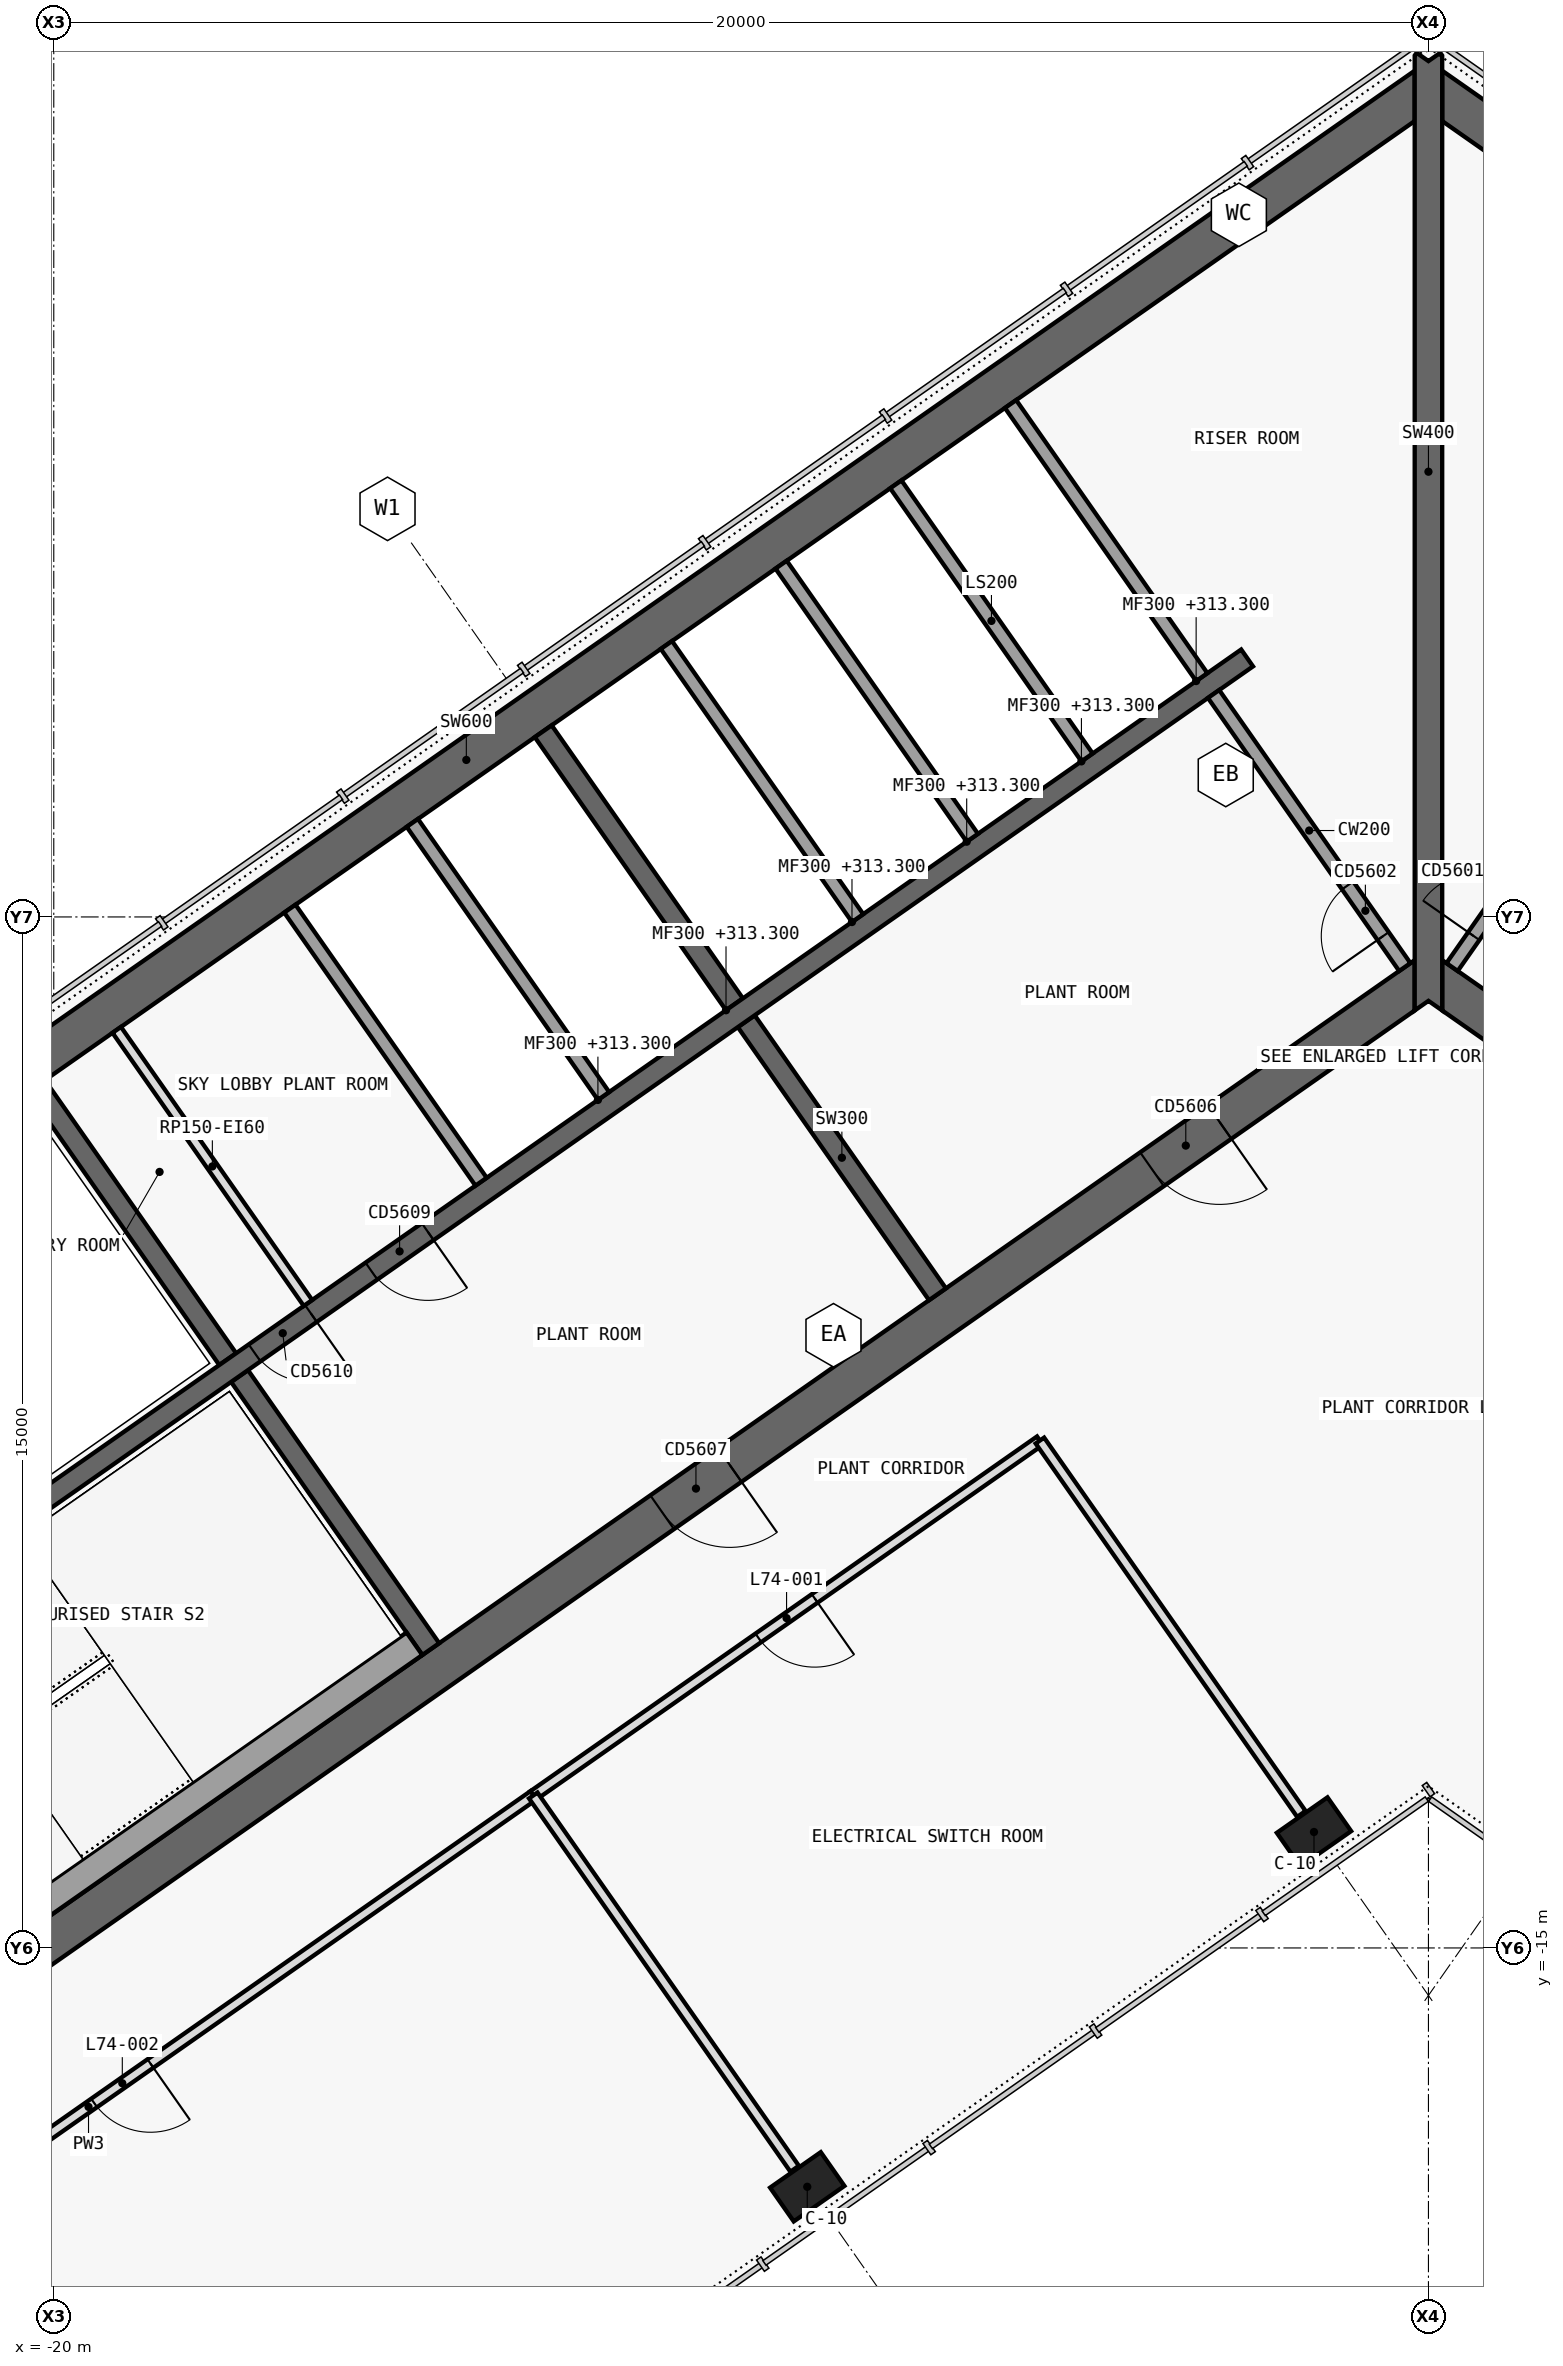
"""IFC4 building model, lengths in metres.
Left out: names, types, materials, properties, quantities, classifications, styles, units other than length and angle.
Written with IfcOpenShell. Run it as: python <this file> out.ifc"""

import sys

from ifc_helpers import new_model, si_unit, direction, frame, frame_2d, origin, origin_2d, place, context, subcontext, project, spatial, polyline, rectangle, outline, extrude, element, fill, save


model = new_model("IFC4")
c1 = context("Model", 3, precision=1e-05, world=origin(), true_north=direction((0.0, 1.0)))
c2 = subcontext(c1, "Body", "Model", "MODEL_VIEW")
j1 = project(units=[si_unit("LENGTHUNIT", "METRE"), si_unit("PLANEANGLEUNIT", "RADIAN")], contexts=[c1])
p1 = place(None, origin())
s1 = spatial("IfcSite", under=j1, at=p1, CompositionType="ELEMENT")
p2 = place(p1, origin())
s2 = spatial("IfcBuilding", under=s1, at=p2, CompositionType="ELEMENT")
p3 = place(p2, frame((0.0, 0.0, 313.3)))
s3 = spatial("IfcBuildingStorey", under=s2, at=p3, CompositionType="ELEMENT", Elevation=313.3)
p4 = place(p3, frame((-0.028, 12.066, 0.0), z_axis=(0.0, 0.0, 1.0), x_axis=(-0.819151382952, -0.573577380837, 0.0)))
e1 = element("IfcWall", 1, at=p4, inside=s3, PredefinedType="SHEAR", context=c2, shape_type="SweptSolid", body=[
    extrude(outline(polyline([(33.898, 0.3), (0.42, 0.3), (0.0, -0.3), (33.898, -0.3), (33.898, 0.3)])), origin(), (0.0, 0.0, 1.0), 5.5),
])
p5 = place(p3, frame((-0.028, -0.874, 0.0), z_axis=(0.0, 0.0, 1.0), x_axis=(-0.819150035022, -0.573579305871, 0.0)))
e2 = element("IfcWall", 2, at=p5, inside=s3, PredefinedType="SHEAR", context=c2, shape_type="SweptSolid", body=[
    extrude(outline(polyline([(26.476, 0.3), (0.42, 0.3), (0.0, -0.3), (26.476, -0.3), (26.476, 0.3)])), origin(), (0.0, 0.0, 1.0), 5.5),
])
p6 = place(p5, frame((3.676, 0.0, 0.0)))
e3 = element("IfcOpeningElement", 3, at=p6, cuts=e2, PredefinedType="OPENING", context=c2, shape_type="SweptSolid", body=[
    extrude(rectangle(XDim=1.2, YDim=2.1, at=frame_2d((0.6, 1.05))), frame((0.0, 0.31, 0.0), z_axis=(0.0, -1.0, 0.0), x_axis=(1.0, 0.0, 0.0)), (0.0, 0.0, 1.0), 0.62),
])
p7 = place(p5, frame((12.376, 0.0, 0.0)))
e4 = element("IfcOpeningElement", 4, at=p7, cuts=e2, PredefinedType="OPENING", context=c2, shape_type="SweptSolid", body=[
    extrude(rectangle(XDim=1.2, YDim=2.1, at=frame_2d((0.6, 1.05))), frame((0.0, 0.31, 0.0), z_axis=(0.0, -1.0, 0.0), x_axis=(1.0, 0.0, 0.0)), (0.0, 0.0, 1.0), 0.62),
])
p8 = place(p3, frame((-7.143, -5.49, 0.0), z_axis=(0.0, 0.0, 1.0), x_axis=(-0.573617744349, 0.819123118565, 0.0)))
e5 = element("IfcWall", 5, at=p8, inside=s3, PredefinedType="SHEAR", context=c2, shape_type="SweptSolid", body=[
    extrude(outline(polyline([(4.85, 0.15), (0.0, 0.15), (0.0, -0.15), (4.85, -0.15), (4.85, 0.15)])), origin(), (0.0, 0.0, 1.0), 5.5),
])
p9 = place(p3, frame((-10.097, -1.271, 0.0), z_axis=(0.0, 0.0, 1.0), x_axis=(-0.573560315113, 0.819163332265, 0.0)))
e6 = element("IfcWall", 6, at=p9, inside=s3, PredefinedType="SHEAR", context=c2, shape_type="SweptSolid", body=[
    extrude(outline(polyline([(4.85, -0.15), (4.85, 0.15), (0.0, 0.15), (0.0, -0.15), (4.85, -0.15)])), origin(), (0.0, 0.0, 1.0), 5.5),
])
p10 = place(p3, frame((-14.515, -10.652, 0.0), z_axis=(0.0, 0.0, 1.0), x_axis=(-0.573560315113, 0.819163332265, 0.0)))
e7 = element("IfcWall", 7, at=p10, inside=s3, PredefinedType="SHEAR", context=c2, shape_type="SweptSolid", body=[
    extrude(outline(polyline([(4.85, 0.15), (0.0, 0.15), (0.0, -0.15), (4.85, -0.15), (4.85, 0.15)])), origin(), (0.0, 0.0, 1.0), 5.5),
])
p11 = place(p3, frame((-17.469, -6.433, 0.0), z_axis=(0.0, 0.0, 1.0), x_axis=(-0.573594092424, 0.81913968109, 0.0)))
e8 = element("IfcWall", 8, at=p11, inside=s3, PredefinedType="SHEAR", context=c2, shape_type="SweptSolid", body=[
    extrude(outline(polyline([(4.85, -0.15), (4.85, 0.15), (0.0, 0.15), (0.0, -0.15), (4.85, -0.15)])), origin(), (0.0, 0.0, 1.0), 5.5),
])
p12 = place(p3, frame((-2.638, 3.768, 0.0), z_axis=(0.0, 0.0, 1.0), x_axis=(-0.819155014212, -0.573572194837, 0.0)))
e9 = element("IfcWall", 9, at=p12, inside=s3, PredefinedType="SHEAR", context=c2, shape_type="SweptSolid", body=[
    extrude(outline(polyline([(26.4, 0.15), (0.0, 0.15), (0.0, -0.15), (26.4, -0.15), (26.4, 0.15)])), origin(), (0.0, 0.0, 1.0), 5.5),
])
p13 = place(p12, frame((14.552, 0.0, 0.0)))
e10 = element("IfcOpeningElement", 10, at=p13, cuts=e9, PredefinedType="OPENING", context=c2, shape_type="SweptSolid", body=[
    extrude(rectangle(XDim=1.0, YDim=2.1, at=frame_2d((0.5, 1.05))), frame((0.0, 0.16, 0.0), z_axis=(0.0, -1.0, 0.0), x_axis=(1.0, 0.0, 0.0)), (0.0, 0.0, 1.0), 0.32),
])
p14 = place(p12, frame((16.627, 0.0, 0.0)))
e11 = element("IfcOpeningElement", 11, at=p14, cuts=e9, PredefinedType="OPENING", context=c2, shape_type="SweptSolid", body=[
    extrude(rectangle(XDim=1.0, YDim=2.1, at=frame_2d((0.5, 1.05))), frame((0.0, 0.16, 0.0), z_axis=(0.0, -1.0, 0.0), x_axis=(1.0, 0.0, 0.0)), (0.0, 0.0, 1.0), 0.32),
])
p15 = place(p3, frame((0.028, 12.066, 0.0), z_axis=(0.0, 0.0, 1.0), x_axis=(0.819151382952, -0.573577380837, 0.0)))
e12 = element("IfcWall", 12, at=p15, inside=s3, PredefinedType="SHEAR", context=c2, shape_type="SweptSolid", body=[
    extrude(outline(polyline([(33.898, 0.3), (0.0, 0.3), (0.42, -0.3), (33.898, -0.3), (33.898, 0.3)])), origin(), (0.0, 0.0, 1.0), 5.5),
])
p16 = place(p3, frame((0.028, -0.874, 0.0), z_axis=(0.0, 0.0, 1.0), x_axis=(0.819150035022, -0.573579305871, 0.0)))
e13 = element("IfcWall", 13, at=p16, inside=s3, PredefinedType="SHEAR", context=c2, shape_type="SweptSolid", body=[
    extrude(outline(polyline([(26.476, 0.3), (0.0, 0.3), (0.42, -0.3), (26.476, -0.3), (26.476, 0.3)])), origin(), (0.0, 0.0, 1.0), 5.5),
])
p17 = place(p16, frame((6.576, 0.0, 0.0)))
e14 = element("IfcOpeningElement", 14, at=p17, cuts=e13, PredefinedType="OPENING", context=c2, shape_type="SweptSolid", body=[
    extrude(rectangle(XDim=1.5, YDim=2.1, at=frame_2d((0.75, 1.05))), frame((0.0, 0.31, 0.0), z_axis=(0.0, -1.0, 0.0), x_axis=(1.0, 0.0, 0.0)), (0.0, 0.0, 1.0), 0.62),
])
p18 = place(p16, frame((12.226, 0.0, 0.0)))
e15 = element("IfcOpeningElement", 15, at=p18, cuts=e13, PredefinedType="OPENING", context=c2, shape_type="SweptSolid", body=[
    extrude(rectangle(XDim=1.5, YDim=2.1, at=frame_2d((0.75, 1.05))), frame((0.0, 0.31, 0.0), z_axis=(0.0, -1.0, 0.0), x_axis=(1.0, 0.0, 0.0)), (0.0, 0.0, 1.0), 0.62),
])
p19 = place(p3, frame((0.0, -1.361, 0.0), z_axis=(0.0, 0.0, 1.0), x_axis=(0.0, 1.0, 0.0)))
e16 = element("IfcWall", 16, at=p19, inside=s3, PredefinedType="SHEAR", context=c2, shape_type="SweptSolid", body=[
    extrude(outline(polyline([(0.14, 0.2), (0.0, 0.2), (0.14, 0.0), (0.0, -0.2), (0.14, -0.2), (1.012, -0.2), (12.94, -0.2), (13.813, -0.2), (13.893, -0.2), (13.933, -0.172), (13.813, 0.0), (13.933, 0.172), (13.893, 0.2), (13.813, 0.2), (12.94, 0.2), (1.012, 0.2), (0.14, 0.2)])), origin(), (0.0, 0.0, 1.0), 5.5),
])
for number, where, z_axis, x_axis in (
    (17, (-1.665, -13.313, 0.0), (0.0, 0.0, 1.0), (-0.819, -0.574, 0.0)),
    (18, (-9.038, -18.475, 0.0), (0.0, 0.0, 1.0), (-0.819, -0.574, 0.0)),
):
    element("IfcColumn", number, at=place(p3, frame(where, z_axis=z_axis, x_axis=x_axis)), inside=s3, PredefinedType="COLUMN", context=c2, shape_type="SweptSolid", body=[
        extrude(rectangle(XDim=0.9, YDim=0.6, at=origin_2d()), origin(), (0.0, 0.0, 1.0), 5.5),
    ])
p20 = place(p3, frame((-4.967, 2.321, 0.0), z_axis=(0.0, 0.0, 1.0), x_axis=(-0.573594092424, 0.81913968109, 0.0)))
e19 = element("IfcWall", 19, at=p20, inside=s3, PredefinedType="SOLIDWALL", context=c2, shape_type="SweptSolid", body=[
    extrude(rectangle(XDim=4.85, YDim=0.2, at=frame_2d((2.425, 0.0))), origin(), (0.0, 0.0, 1.0), 5.22),
])
p21 = place(p3, frame((-6.636, 1.152, 0.0), z_axis=(0.0, 0.0, 1.0), x_axis=(-0.573560315113, 0.819163332265, 0.0)))
e20 = element("IfcWall", 20, at=p21, inside=s3, PredefinedType="SOLIDWALL", context=c2, shape_type="SweptSolid", body=[
    extrude(rectangle(XDim=4.85, YDim=0.2, at=frame_2d((2.425, 0.0))), origin(), (0.0, 0.0, 1.0), 5.22),
])
p22 = place(p3, frame((-8.305, -0.017, 0.0), z_axis=(0.0, 0.0, 1.0), x_axis=(-0.573594092424, 0.81913968109, 0.0)))
e21 = element("IfcWall", 21, at=p22, inside=s3, PredefinedType="SOLIDWALL", context=c2, shape_type="SweptSolid", body=[
    extrude(rectangle(XDim=4.85, YDim=0.2, at=frame_2d((2.425, 0.0))), origin(), (0.0, 0.0, 1.0), 5.22),
])
p23 = place(p3, frame((-16.302, -5.616, 0.0), z_axis=(0.0, 0.0, 1.0), x_axis=(-0.573560315113, 0.819163332265, 0.0)))
e22 = element("IfcWall", 22, at=p23, inside=s3, PredefinedType="PARTITIONING", context=c2, shape_type="SweptSolid", body=[
    extrude(rectangle(XDim=4.85, YDim=0.15, at=frame_2d((2.425, 0.0))), origin(), (0.0, 0.0, 1.0), 5.22),
])
p24 = place(p3, frame((-12.001, -2.605, 0.0), z_axis=(0.0, 0.0, 1.0), x_axis=(-0.573560315113, 0.819163332265, 0.0)))
e23 = element("IfcWall", 23, at=p24, inside=s3, PredefinedType="SOLIDWALL", context=c2, shape_type="SweptSolid", body=[
    extrude(rectangle(XDim=4.85, YDim=0.2, at=frame_2d((2.425, 0.0))), origin(), (0.0, 0.0, 1.0), 5.22),
])
p25 = place(p3, frame((-13.783, -3.852, 0.0), z_axis=(0.0, 0.0, 1.0), x_axis=(-0.573594092424, 0.81913968109, 0.0)))
e24 = element("IfcWall", 24, at=p25, inside=s3, PredefinedType="SOLIDWALL", context=c2, shape_type="SweptSolid", body=[
    extrude(rectangle(XDim=4.85, YDim=0.2, at=frame_2d((2.425, 0.0))), origin(), (0.0, 0.0, 1.0), 5.22),
])
p26 = place(p3, frame((-14.753, -10.574, 0.0), z_axis=(0.0, 0.0, 1.0), x_axis=(-0.819158229677, -0.573567602601, 0.0)))
e25 = element("IfcWall", 25, at=p26, inside=s3, PredefinedType="SOLIDWALL", context=c2, shape_type="SweptSolid", body=[
    extrude(rectangle(XDim=8.25, YDim=0.4, at=frame_2d((4.125, 0.0))), origin(), (0.0, 0.0, 1.0), 5.22),
])
p27 = place(p3, frame((-0.344, -0.729, 0.0), z_axis=(0.0, 0.0, 1.0), x_axis=(-0.573560315113, 0.819163332265, 0.0)))
e26 = element("IfcWall", 26, at=p27, inside=s3, PredefinedType="SOLIDWALL", context=c2, shape_type="SweptSolid", body=[
    extrude(rectangle(XDim=4.85, YDim=0.2, at=frame_2d((2.425, 0.0))), origin(), (0.0, 0.0, 1.0), 5.22),
])
p28 = place(p27, frame((0.55, 0.0, 0.0)))
e27 = element("IfcOpeningElement", 27, at=p28, cuts=e26, PredefinedType="OPENING", context=c2, shape_type="SweptSolid", body=[
    extrude(rectangle(XDim=0.9, YDim=2.1, at=frame_2d((0.45, 1.05))), frame((0.0, 0.11, 0.0), z_axis=(0.0, -1.0, 0.0), x_axis=(1.0, 0.0, 0.0)), (0.0, 0.0, 1.0), 0.22),
])
p29 = place(p3, frame((-3.298, 3.49, 0.0), z_axis=(0.0, 0.0, 1.0), x_axis=(-0.573560315113, 0.819163332265, 0.0)))
e28 = element("IfcWall", 28, at=p29, inside=s3, PredefinedType="SOLIDWALL", context=c2, shape_type="SweptSolid", body=[
    extrude(rectangle(XDim=4.85, YDim=0.2, at=frame_2d((2.425, 0.0))), origin(), (0.0, 0.0, 1.0), 5.22),
])
p30 = place(p3, frame((0.344, -0.729, 0.0), z_axis=(0.0, 0.0, 1.0), x_axis=(0.573560315113, 0.819163332265, 0.0)))
e29 = element("IfcWall", 29, at=p30, inside=s3, PredefinedType="SOLIDWALL", context=c2, shape_type="SweptSolid", body=[
    extrude(rectangle(XDim=4.85, YDim=0.2, at=frame_2d((2.425, 0.0))), origin(), (0.0, 0.0, 1.0), 5.22),
])
p31 = place(p30, frame((0.55, 0.0, 0.0)))
e30 = element("IfcOpeningElement", 30, at=p31, cuts=e29, PredefinedType="OPENING", context=c2, shape_type="SweptSolid", body=[
    extrude(rectangle(XDim=0.9, YDim=2.1, at=frame_2d((0.45, 1.05))), frame((0.0, 0.11, 0.0), z_axis=(0.0, -1.0, 0.0), x_axis=(1.0, 0.0, 0.0)), (0.0, 0.0, 1.0), 0.22),
])
p32 = place(p3, frame((-5.652, -7.62, 0.0), z_axis=(0.0, 0.0, 1.0), x_axis=(-0.81915291695, -0.57357519006, 0.0)))
e31 = element("IfcWall", 31, at=p32, inside=s3, PredefinedType="PARTITIONING", context=c2, shape_type="SweptSolid", body=[
    extrude(rectangle(XDim=9.002, YDim=0.15, at=frame_2d((4.501, 0.0))), origin(), (0.0, 0.0, 1.0), 5.2),
])
p33 = place(p32, frame((4.001, 0.0, 0.0)))
e32 = element("IfcOpeningElement", 32, at=p33, cuts=e31, PredefinedType="OPENING", context=c2, shape_type="SweptSolid", body=[
    extrude(rectangle(XDim=1.0, YDim=2.1, at=frame_2d((0.5, 1.05))), frame((0.0, 0.085, 0.0), z_axis=(0.0, -1.0, 0.0), x_axis=(1.0, 0.0, 0.0)), (0.0, 0.0, 1.0), 0.17),
])
p34 = place(p3, frame((-13.022, -12.781, 0.0), z_axis=(0.0, 0.0, 1.0), x_axis=(-0.819154247226, -0.573573290217, 0.0)))
e33 = element("IfcWall", 33, at=p34, inside=s3, PredefinedType="PARTITIONING", context=c2, shape_type="SweptSolid", body=[
    extrude(rectangle(XDim=15.802, YDim=0.15, at=frame_2d((7.901, 0.0))), origin(), (0.0, 0.0, 1.0), 5.2),
])
p35 = place(p34, frame((6.801, 0.0, 0.0)))
e34 = element("IfcOpeningElement", 34, at=p35, cuts=e33, PredefinedType="OPENING", context=c2, shape_type="SweptSolid", body=[
    extrude(rectangle(XDim=1.0, YDim=2.1, at=frame_2d((0.5, 1.05))), frame((0.0, 0.085, 0.0), z_axis=(0.0, -1.0, 0.0), x_axis=(1.0, 0.0, 0.0)), (0.0, 0.0, 1.0), 0.17),
])
p36 = place(p3, frame((-1.849, -13.051, 0.0), z_axis=(0.0, 0.0, 1.0), x_axis=(-0.573575988258, 0.819152358047, 0.0)))
e35 = element("IfcWall", 35, at=p36, inside=s3, PredefinedType="PARTITIONING", context=c2, shape_type="SweptSolid", body=[
    extrude(rectangle(XDim=6.632, YDim=0.15, at=frame_2d((3.316, 0.0))), origin(), (0.0, 0.0, 1.0), 5.2),
])
p37 = place(p3, frame((-9.221, -18.213, 0.0), z_axis=(0.0, 0.0, 1.0), x_axis=(-0.573556251799, 0.819166177294, 0.0)))
e36 = element("IfcWall", 36, at=p37, inside=s3, PredefinedType="PARTITIONING", context=c2, shape_type="SweptSolid", body=[
    extrude(rectangle(XDim=6.63, YDim=0.15, at=frame_2d((3.315, 0.0))), origin(), (0.0, 0.0, 1.0), 5.2),
])
p38 = place(p13, origin())
e37 = element("IfcDoor", 37, at=p38, inside=s3, OperationType="SINGLE_SWING_RIGHT", PredefinedType="DOOR", context=c2, shape_type="SweptSolid", body=[
    extrude(rectangle(XDim=1.0, YDim=2.1, at=frame_2d((0.5, 1.05))), frame((0.0, 0.025, 0.0), z_axis=(0.0, -1.0, 0.0), x_axis=(1.0, 0.0, 0.0)), (0.0, 0.0, 1.0), 0.05),
])
fill(e10, e37)
p39 = place(p14, origin())
e38 = element("IfcDoor", 38, at=p39, inside=s3, OperationType="SINGLE_SWING_RIGHT", PredefinedType="DOOR", context=c2, shape_type="SweptSolid", body=[
    extrude(rectangle(XDim=1.0, YDim=2.1, at=frame_2d((0.5, 1.05))), frame((0.0, 0.025, 0.0), z_axis=(0.0, -1.0, 0.0), x_axis=(1.0, 0.0, 0.0)), (0.0, 0.0, 1.0), 0.05),
])
fill(e11, e38)
p40 = place(p6, origin())
e39 = element("IfcDoor", 39, at=p40, inside=s3, OperationType="SINGLE_SWING_RIGHT", PredefinedType="DOOR", context=c2, shape_type="SweptSolid", body=[
    extrude(rectangle(XDim=1.2, YDim=2.1, at=frame_2d((0.6, 1.05))), frame((0.0, 0.025, 0.0), z_axis=(0.0, -1.0, 0.0), x_axis=(1.0, 0.0, 0.0)), (0.0, 0.0, 1.0), 0.05),
])
fill(e3, e39)
p41 = place(p7, origin())
e40 = element("IfcDoor", 40, at=p41, inside=s3, OperationType="SINGLE_SWING_RIGHT", PredefinedType="DOOR", context=c2, shape_type="SweptSolid", body=[
    extrude(rectangle(XDim=1.2, YDim=2.1, at=frame_2d((0.6, 1.05))), frame((0.0, 0.025, 0.0), z_axis=(0.0, -1.0, 0.0), x_axis=(1.0, 0.0, 0.0)), (0.0, 0.0, 1.0), 0.05),
])
fill(e4, e40)
p42 = place(p28, origin())
e41 = element("IfcDoor", 41, at=p42, inside=s3, OperationType="SINGLE_SWING_RIGHT", PredefinedType="DOOR", context=c2, shape_type="SweptSolid", body=[
    extrude(rectangle(XDim=0.9, YDim=2.1, at=frame_2d((0.45, 1.05))), frame((0.0, 0.025, 0.0), z_axis=(0.0, -1.0, 0.0), x_axis=(1.0, 0.0, 0.0)), (0.0, 0.0, 1.0), 0.05),
])
fill(e27, e41)
p43 = place(p31, origin())
e42 = element("IfcDoor", 42, at=p43, inside=s3, OperationType="SINGLE_SWING_RIGHT", PredefinedType="DOOR", context=c2, shape_type="SweptSolid", body=[
    extrude(rectangle(XDim=0.9, YDim=2.1, at=frame_2d((0.45, 1.05))), frame((0.0, 0.025, 0.0), z_axis=(0.0, -1.0, 0.0), x_axis=(1.0, 0.0, 0.0)), (0.0, 0.0, 1.0), 0.05),
])
fill(e30, e42)
p44 = place(p33, origin())
e43 = element("IfcDoor", 43, at=p44, inside=s3, OperationType="SINGLE_SWING_RIGHT", PredefinedType="DOOR", context=c2, shape_type="SweptSolid", body=[
    extrude(rectangle(XDim=1.0, YDim=2.1, at=frame_2d((0.5, 1.05))), frame((0.0, 0.025, 0.0), z_axis=(0.0, -1.0, 0.0), x_axis=(1.0, 0.0, 0.0)), (0.0, 0.0, 1.0), 0.05),
])
fill(e32, e43)
p45 = place(p35, origin())
e44 = element("IfcDoor", 44, at=p45, inside=s3, OperationType="SINGLE_SWING_LEFT", PredefinedType="DOOR", context=c2, shape_type="SweptSolid", body=[
    extrude(rectangle(XDim=1.0, YDim=2.1, at=frame_2d((0.5, 1.05))), frame((0.0, 0.025, 0.0), z_axis=(0.0, -1.0, 0.0), x_axis=(1.0, 0.0, 0.0)), (0.0, 0.0, 1.0), 0.05),
])
fill(e34, e44)
save(model, sys.argv[1])
